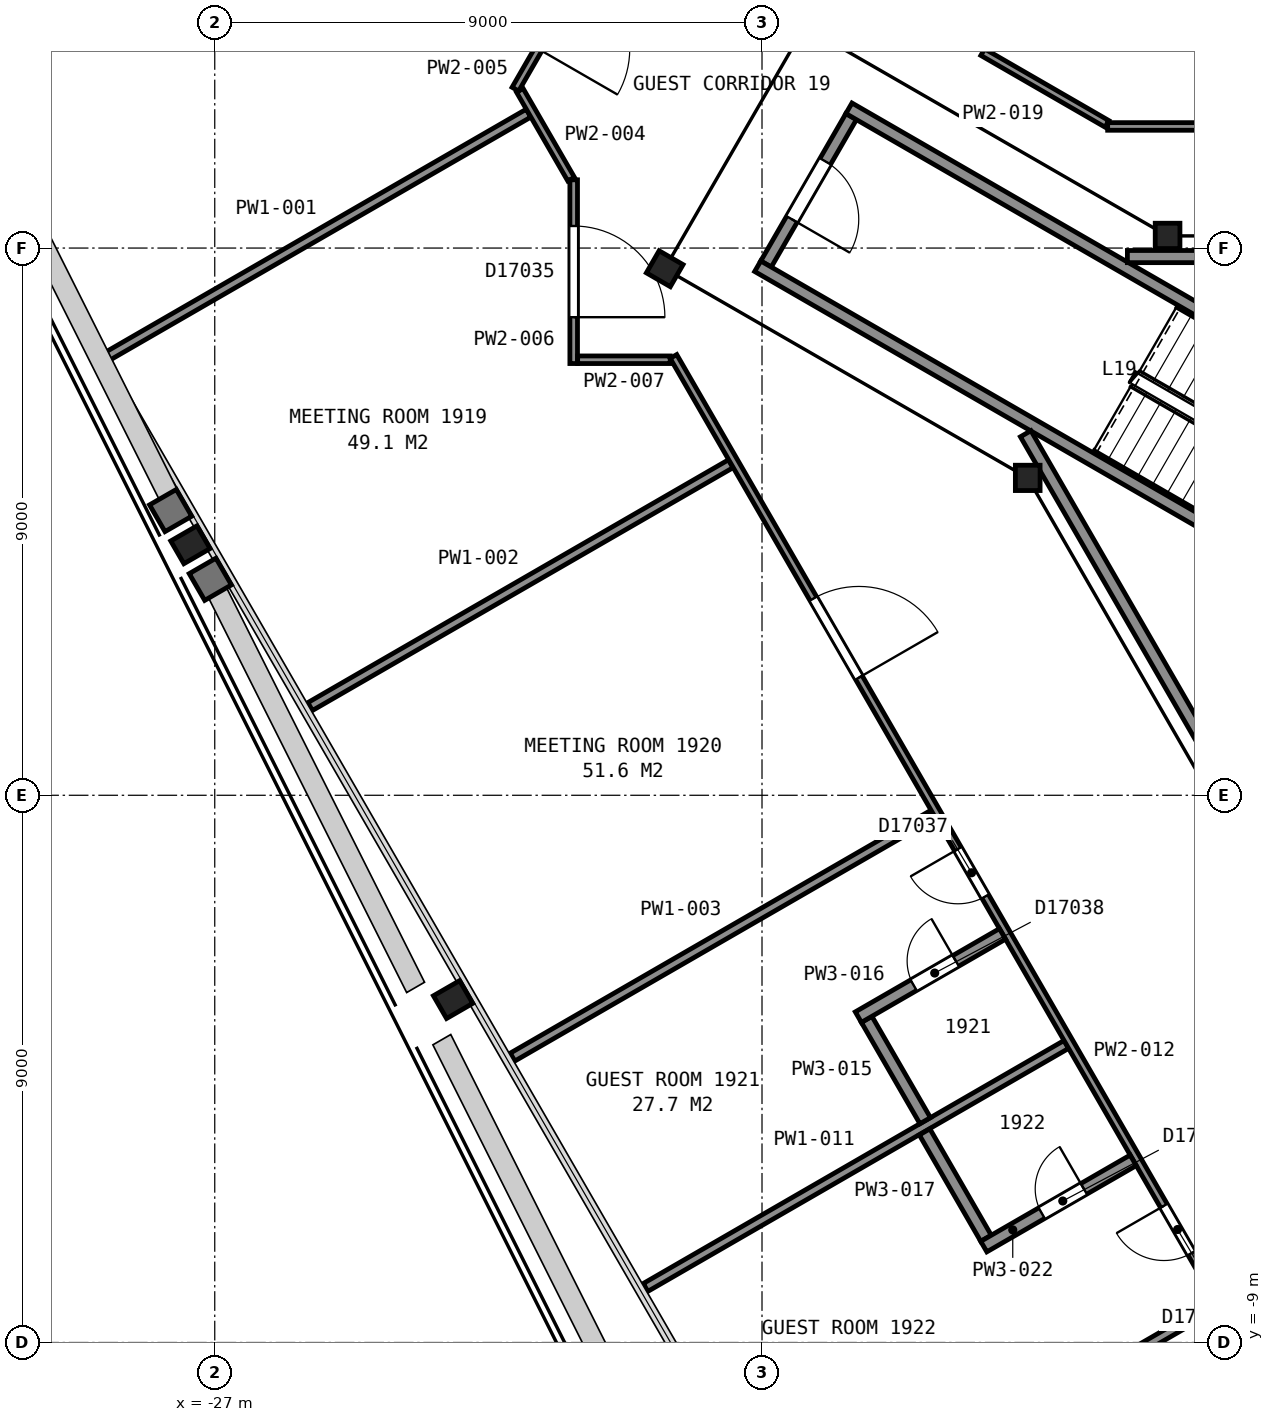
"""IFC4 building model, lengths in metres.
Left out: names, types, materials, properties, quantities, classifications, styles, units other than length and angle.
Written with IfcOpenShell. Run it as: python <this file> out.ifc"""

import sys

from ifc_helpers import new_model, si_unit, direction, frame, frame_2d, origin, origin_2d, place, context, subcontext, project, spatial, rectangle, i_section, extrude, element, fill, save


model = new_model("IFC4")
c1 = context("Model", 3, precision=1e-05, world=origin(), true_north=direction((0.0, 1.0)))
c2 = subcontext(c1, "Body", "Model", "MODEL_VIEW")
j1 = project(units=[si_unit("LENGTHUNIT", "METRE"), si_unit("PLANEANGLEUNIT", "RADIAN")], contexts=[c1])
p1 = place(None, origin())
s1 = spatial("IfcSite", under=j1, at=p1, CompositionType="ELEMENT")
p2 = place(p1, origin())
s2 = spatial("IfcBuilding", under=s1, at=p2, CompositionType="ELEMENT")
p3 = place(p2, frame((0.0, 0.0, 83.6)))
s3 = spatial("IfcBuildingStorey", under=s2, at=p3, CompositionType="ELEMENT", Elevation=83.6)
for number, where, z_axis, x_axis in (
    (1, (-27.4, 4.12, 0.0), (0.0, 0.0, 1.0), (-0.5, 0.866, 0.0)),
    (2, (-23.08, -3.36, 0.0), (0.0, 0.0, 1.0), (-0.5, 0.866, 0.0)),
):
    element("IfcColumn", number, at=place(p3, frame(where, z_axis=z_axis, x_axis=x_axis)), inside=s3, PredefinedType="COLUMN", context=c2, shape_type="SweptSolid", body=[
        extrude(i_section(OverallWidth=0.432, OverallDepth=0.498, WebThickness=0.056, FlangeThickness=0.089, FilletRadius=0.015, at=origin_2d()), origin(), (0.0, 0.0, 1.0), 2.87),
    ])
p4 = place(p3, frame((-11.33, 9.2, 0.0), z_axis=(0.0, 0.0, 1.0), x_axis=(1.0, 0.0, 0.0)))
e3 = element("IfcColumn", 3, at=p4, inside=s3, PredefinedType="COLUMN", context=c2, shape_type="SweptSolid", body=[
    extrude(i_section(OverallWidth=0.406, OverallDepth=0.417, WebThickness=0.03, FlangeThickness=0.048, FilletRadius=0.015, at=origin_2d()), origin(), (0.0, 0.0, 1.0), 3.6),
])
p5 = place(p3, frame((-19.6, 8.66, 0.0), z_axis=(0.0, 0.0, 1.0), x_axis=(0.5, 0.866025403784, 0.0)))
e4 = element("IfcColumn", 4, at=p5, inside=s3, PredefinedType="COLUMN", context=c2, shape_type="SweptSolid", body=[
    extrude(i_section(OverallWidth=0.419, OverallDepth=0.455, WebThickness=0.042, FlangeThickness=0.068, FilletRadius=0.015, at=origin_2d()), origin(), (0.0, 0.0, 1.0), 3.6),
])
p6 = place(p3, frame((-13.63, 5.22, 0.0), z_axis=(0.0, 0.0, 1.0), x_axis=(1.0, 0.0, 0.0)))
e5 = element("IfcColumn", 5, at=p6, inside=s3, PredefinedType="COLUMN", context=c2, shape_type="SweptSolid", body=[
    extrude(i_section(OverallWidth=0.406, OverallDepth=0.417, WebThickness=0.03, FlangeThickness=0.048, FilletRadius=0.015, at=origin_2d()), origin(), (0.0, 0.0, 1.0), 3.6),
])
p7 = place(p3, frame((-16.534, 11.162, 0.0), z_axis=(0.0, 0.0, 1.0), x_axis=(-0.49998411664, -0.866034573852, 0.0)))
e6 = element("IfcWall", 6, at=p7, inside=s3, PredefinedType="PARTITIONING", context=c2, shape_type="SweptSolid", body=[
    extrude(rectangle(XDim=2.8, YDim=0.2, at=frame_2d((1.4, 0.0))), origin(), (0.0, 0.0, 1.0), 3.35),
])
p8 = place(p7, frame((0.85, 0.0, 0.0)))
e7 = element("IfcOpeningElement", 7, at=p8, cuts=e6, PredefinedType="OPENING", context=c2, shape_type="SweptSolid", body=[
    extrude(rectangle(XDim=1.1, YDim=2.1, at=frame_2d((0.55, 1.05))), frame((0.0, 0.11, 0.0), z_axis=(0.0, -1.0, 0.0), x_axis=(1.0, 0.0, 0.0)), (0.0, 0.0, 1.0), 0.22),
])
for number, where, z_axis, x_axis in (
    (8, (-7.678, 2.701, 0.0), (0.0, 0.0, 1.0), (-0.866, 0.5, 0.0)),
    (9, (-6.178, 5.299, 0.0), (0.0, 0.0, 1.0), (-0.866, 0.5, 0.0)),
):
    element("IfcWall", number, at=place(p3, frame(where, z_axis=z_axis, x_axis=x_axis)), inside=s3, PredefinedType="PARTITIONING", context=c2, shape_type="SweptSolid", body=[
        extrude(rectangle(XDim=12.0, YDim=0.2, at=frame_2d((6.0, 0.0))), origin(), (0.0, 0.0, 1.0), 3.35),
    ])
p9 = place(p3, frame((-13.664, 5.946, 0.0), z_axis=(0.0, 0.0, 1.0), x_axis=(0.499994327219, -0.866028678941, 0.0)))
e10 = element("IfcWall", 10, at=p9, inside=s3, PredefinedType="PARTITIONING", context=c2, shape_type="SweptSolid", body=[
    extrude(rectangle(XDim=23.968, YDim=0.2, at=frame_2d((11.984, 0.0))), origin(), (0.0, 0.0, 1.0), 3.35),
])
p10 = place(p3, frame((0.263, 8.86, 0.0), z_axis=(0.0, 0.0, 1.0), x_axis=(-1.0, 0.0, 0.0)))
e11 = element("IfcWall", 11, at=p10, inside=s3, PredefinedType="PARTITIONING", context=c2, shape_type="SweptSolid", body=[
    extrude(rectangle(XDim=12.254, YDim=0.2, at=frame_2d((6.127, 0.0))), origin(), (0.0, 0.0, 1.0), 3.35),
])
p11 = place(p10, frame((5.709, 0.0, 0.0)))
e12 = element("IfcOpeningElement", 12, at=p11, cuts=e11, PredefinedType="OPENING", context=c2, shape_type="SweptSolid", body=[
    extrude(rectangle(XDim=1.8, YDim=2.1, at=frame_2d((0.9, 1.05))), frame((0.0, 0.11, 0.0), z_axis=(0.0, -1.0, 0.0), x_axis=(1.0, 0.0, 0.0)), (0.0, 0.0, 1.0), 0.22),
])
p12 = place(p3, frame((-28.76, 7.223, 0.0), z_axis=(0.0, 0.0, 1.0), x_axis=(0.866019724796, 0.500009836168, 0.0)))
e13 = element("IfcWall", 13, at=p12, inside=s3, PredefinedType="PARTITIONING", context=c2, shape_type="SweptSolid", body=[
    extrude(rectangle(XDim=7.991, YDim=0.15, at=frame_2d((3.996, 0.0))), origin(), (0.0, 0.0, 1.0), 2.262),
])
p13 = place(p3, frame((-25.432, 1.459, 0.0), z_axis=(0.0, 0.0, 1.0), x_axis=(0.866052736899, 0.499952654668, 0.0)))
e14 = element("IfcWall", 14, at=p13, inside=s3, PredefinedType="PARTITIONING", context=c2, shape_type="SweptSolid", body=[
    extrude(rectangle(XDim=7.987, YDim=0.15, at=frame_2d((3.994, 0.0))), origin(), (0.0, 0.0, 1.0), 2.262),
])
p14 = place(p3, frame((-22.103, -4.306, 0.0), z_axis=(0.0, 0.0, 1.0), x_axis=(0.866016576429, 0.500015289116, 0.0)))
e15 = element("IfcWall", 15, at=p14, inside=s3, PredefinedType="PARTITIONING", context=c2, shape_type="SweptSolid", body=[
    extrude(rectangle(XDim=7.987, YDim=0.15, at=frame_2d((3.993, 0.0))), origin(), (0.0, 0.0, 1.0), 2.262),
])
p15 = place(p3, frame((-21.982, 11.594, 0.0), z_axis=(0.0, 0.0, 1.0), x_axis=(0.500048373822, -0.865997473344, 0.0)))
e16 = element("IfcWall", 16, at=p15, inside=s3, PredefinedType="PARTITIONING", context=c2, shape_type="SweptSolid", body=[
    extrude(rectangle(XDim=1.686, YDim=0.125, at=frame_2d((0.843, 0.0))), origin(), (0.0, 0.0, 1.0), 2.262),
])
p16 = place(p3, frame((-22.056, 11.613, 0.0), z_axis=(0.0, 0.0, 1.0), x_axis=(0.499647745683, 0.866228682412, 0.0)))
e17 = element("IfcWall", 17, at=p16, inside=s3, PredefinedType="PARTITIONING", context=c2, shape_type="SweptSolid", body=[
    extrude(rectangle(XDim=2.829, YDim=0.125, at=frame_2d((1.415, 0.0))), origin(), (0.0, 0.0, 1.0), 2.262),
])
p17 = place(p16, frame((0.762, 0.0, 0.0)))
e18 = element("IfcOpeningElement", 18, at=p17, cuts=e17, PredefinedType="OPENING", context=c2, shape_type="SweptSolid", body=[
    extrude(rectangle(XDim=1.5, YDim=2.1, at=frame_2d((0.75, 1.05))), frame((0.0, 0.073, 0.0), z_axis=(0.0, -1.0, 0.0), x_axis=(1.0, 0.0, 0.0)), (0.0, 0.0, 1.0), 0.145),
])
p18 = place(p3, frame((-21.097, 7.101, 0.0), z_axis=(0.0, 0.0, 1.0), x_axis=(0.0, 1.0, 0.0)))
e19 = element("IfcWall", 19, at=p18, inside=s3, PredefinedType="PARTITIONING", context=c2, shape_type="SweptSolid", body=[
    extrude(rectangle(XDim=3.022, YDim=0.125, at=frame_2d((1.511, 0.0))), origin(), (0.0, 0.0, 1.0), 2.262),
])
p19 = place(p18, frame((0.762, 0.0, 0.0)))
e20 = element("IfcOpeningElement", 20, at=p19, cuts=e19, PredefinedType="OPENING", context=c2, shape_type="SweptSolid", body=[
    extrude(rectangle(XDim=1.5, YDim=2.1, at=frame_2d((0.75, 1.05))), frame((0.0, 0.073, 0.0), z_axis=(0.0, -1.0, 0.0), x_axis=(1.0, 0.0, 0.0)), (0.0, 0.0, 1.0), 0.145),
])
p20 = place(p3, frame((-21.032, 7.163, 0.0), z_axis=(0.0, 0.0, 1.0), x_axis=(1.0, 0.0, 0.0)))
e21 = element("IfcWall", 21, at=p20, inside=s3, PredefinedType="PARTITIONING", context=c2, shape_type="SweptSolid", body=[
    extrude(rectangle(XDim=1.522, YDim=0.125, at=frame_2d((0.761, 0.0))), origin(), (0.0, 0.0, 1.0), 2.262),
])
p21 = place(p3, frame((-19.916, -8.095, 0.0), z_axis=(0.0, 0.0, 1.0), x_axis=(0.865953574939, 0.500124390578, 0.0)))
e22 = element("IfcWall", 22, at=p21, inside=s3, PredefinedType="PARTITIONING", context=c2, shape_type="SweptSolid", body=[
    extrude(rectangle(XDim=7.992, YDim=0.15, at=frame_2d((3.996, 0.0))), origin(), (0.0, 0.0, 1.0), 2.262),
])
p22 = place(p3, frame((-3.766, -19.958, 0.0), z_axis=(0.0, 0.0, 1.0), x_axis=(-0.50002170027, 0.866012874765, 0.0)))
e23 = element("IfcWall", 23, at=p22, inside=s3, PredefinedType="PARTITIONING", context=c2, shape_type="SweptSolid", body=[
    extrude(rectangle(XDim=31.379, YDim=0.125, at=frame_2d((15.69, 0.0))), origin(), (0.0, 0.0, 1.0), 2.262),
])
p23 = place(p22, frame((25.28, 0.0, 0.0)))
e24 = element("IfcOpeningElement", 24, at=p23, cuts=e23, PredefinedType="OPENING", context=c2, shape_type="SweptSolid", body=[
    extrude(rectangle(XDim=1.5, YDim=2.1, at=frame_2d((0.75, 1.05))), frame((0.0, 0.073, 0.0), z_axis=(0.0, -1.0, 0.0), x_axis=(1.0, 0.0, 0.0)), (0.0, 0.0, 1.0), 0.145),
])
p24 = place(p22, frame((21.124, 0.0, 0.0)))
e25 = element("IfcOpeningElement", 25, at=p24, cuts=e23, PredefinedType="OPENING", context=c2, shape_type="SweptSolid", body=[
    extrude(rectangle(XDim=0.9, YDim=2.1, at=frame_2d((0.45, 1.05))), frame((0.0, 0.073, 0.0), z_axis=(0.0, -1.0, 0.0), x_axis=(1.0, 0.0, 0.0)), (0.0, 0.0, 1.0), 0.145),
])
p25 = place(p22, frame((14.349, 0.0, 0.0)))
e26 = element("IfcOpeningElement", 26, at=p25, cuts=e23, PredefinedType="OPENING", context=c2, shape_type="SweptSolid", body=[
    extrude(rectangle(XDim=0.9, YDim=2.1, at=frame_2d((0.45, 1.05))), frame((0.0, 0.073, 0.0), z_axis=(0.0, -1.0, 0.0), x_axis=(1.0, 0.0, 0.0)), (0.0, 0.0, 1.0), 0.145),
])
p26 = place(p22, frame((11.804, 0.0, 0.0)))
e27 = element("IfcOpeningElement", 27, at=p26, cuts=e23, PredefinedType="OPENING", context=c2, shape_type="SweptSolid", body=[
    extrude(rectangle(XDim=0.9, YDim=2.1, at=frame_2d((0.45, 1.05))), frame((0.0, 0.073, 0.0), z_axis=(0.0, -1.0, 0.0), x_axis=(1.0, 0.0, 0.0)), (0.0, 0.0, 1.0), 0.145),
])
p27 = place(p22, frame((5.33, 0.0, 0.0)))
e28 = element("IfcOpeningElement", 28, at=p27, cuts=e23, PredefinedType="OPENING", context=c2, shape_type="SweptSolid", body=[
    extrude(rectangle(XDim=0.9, YDim=2.1, at=frame_2d((0.45, 1.05))), frame((0.0, 0.073, 0.0), z_axis=(0.0, -1.0, 0.0), x_axis=(1.0, 0.0, 0.0)), (0.0, 0.0, 1.0), 0.145),
])
p28 = place(p22, frame((2.906, 0.0, 0.0)))
e29 = element("IfcOpeningElement", 29, at=p28, cuts=e23, PredefinedType="OPENING", context=c2, shape_type="SweptSolid", body=[
    extrude(rectangle(XDim=1.0, YDim=2.1, at=frame_2d((0.5, 1.05))), frame((0.0, 0.073, 0.0), z_axis=(0.0, -1.0, 0.0), x_axis=(1.0, 0.0, 0.0)), (0.0, 0.0, 1.0), 0.145),
])
p29 = place(p3, frame((-17.443, -12.377, 0.0), z_axis=(0.0, 0.0, 1.0), x_axis=(0.866021771655, 0.500006290979, 0.0)))
e30 = element("IfcWall", 30, at=p29, inside=s3, PredefinedType="PARTITIONING", context=c2, shape_type="SweptSolid", body=[
    extrude(rectangle(XDim=7.992, YDim=0.15, at=frame_2d((3.996, 0.0))), origin(), (0.0, 0.0, 1.0), 2.262),
])
p30 = place(p3, frame((-16.279, -3.686, 0.0), z_axis=(0.0, 0.0, 1.0), x_axis=(0.500190942922, -0.865915134767, 0.0)))
e31 = element("IfcWall", 31, at=p30, inside=s3, PredefinedType="PARTITIONING", context=c2, shape_type="SweptSolid", body=[
    extrude(rectangle(XDim=1.925, YDim=0.2, at=frame_2d((0.962, 0.0))), origin(), (0.0, 0.0, 1.0), 2.262),
])
p31 = place(p3, frame((-14.045, -2.28, 0.0), z_axis=(0.0, 0.0, 1.0), x_axis=(-0.866005850709, -0.50003386539, 0.0)))
e32 = element("IfcWall", 32, at=p31, inside=s3, PredefinedType="PARTITIONING", context=c2, shape_type="SweptSolid", body=[
    extrude(rectangle(XDim=2.737, YDim=0.2, at=frame_2d((1.369, 0.0))), origin(), (0.0, 0.0, 1.0), 2.262),
])
p32 = place(p31, frame((0.887, 0.0, 0.0)))
e33 = element("IfcOpeningElement", 33, at=p32, cuts=e32, PredefinedType="OPENING", context=c2, shape_type="SweptSolid", body=[
    extrude(rectangle(XDim=0.8, YDim=2.1, at=frame_2d((0.4, 1.05))), frame((0.0, 0.11, 0.0), z_axis=(0.0, -1.0, 0.0), x_axis=(1.0, 0.0, 0.0)), (0.0, 0.0, 1.0), 0.22),
])
p33 = place(p3, frame((-15.326, -5.536, 0.0), z_axis=(0.0, 0.0, 1.0), x_axis=(0.499868889286, -0.866101087359, 0.0)))
e34 = element("IfcWall", 34, at=p33, inside=s3, PredefinedType="PARTITIONING", context=c2, shape_type="SweptSolid", body=[
    extrude(rectangle(XDim=2.021, YDim=0.2, at=frame_2d((1.01, 0.0))), origin(), (0.0, 0.0, 1.0), 2.262),
])
p34 = place(p3, frame((-14.37, 12.222, 0.0), z_axis=(0.0, 0.0, 1.0), x_axis=(0.866063239147, -0.499934461503, 0.0)))
e35 = element("IfcWall", 35, at=p34, inside=s3, PredefinedType="PARTITIONING", context=c2, shape_type="SweptSolid", body=[
    extrude(rectangle(XDim=2.359, YDim=0.125, at=frame_2d((1.18, 0.0))), origin(), (0.0, 0.0, 1.0), 2.262),
])
p35 = place(p3, frame((-14.353, -7.423, 0.0), z_axis=(0.0, 0.0, 1.0), x_axis=(0.866010792954, 0.500025305846, 0.0)))
e36 = element("IfcWall", 36, at=p35, inside=s3, PredefinedType="PARTITIONING", context=c2, shape_type="SweptSolid", body=[
    extrude(rectangle(XDim=2.838, YDim=0.2, at=frame_2d((1.419, 0.0))), origin(), (0.0, 0.0, 1.0), 2.262),
])
p36 = place(p35, frame((1.1, 0.0, 0.0)))
e37 = element("IfcOpeningElement", 37, at=p36, cuts=e36, PredefinedType="OPENING", context=c2, shape_type="SweptSolid", body=[
    extrude(rectangle(XDim=0.8, YDim=2.1, at=frame_2d((0.4, 1.05))), frame((0.0, 0.11, 0.0), z_axis=(0.0, -1.0, 0.0), x_axis=(1.0, 0.0, 0.0)), (0.0, 0.0, 1.0), 0.22),
])
p37 = place(p3, frame((-12.315, 11.0, 0.0), z_axis=(0.0, 0.0, 1.0), x_axis=(1.0, 0.0, 0.0)))
e38 = element("IfcWall", 38, at=p37, inside=s3, PredefinedType="PARTITIONING", context=c2, shape_type="SweptSolid", body=[
    extrude(rectangle(XDim=24.631, YDim=0.125, at=frame_2d((12.315, 0.0))), origin(), (0.0, 0.0, 1.0), 2.262),
])
p38 = place(p37, frame((11.812, 0.0, 0.0)))
e39 = element("IfcOpeningElement", 39, at=p38, cuts=e38, PredefinedType="OPENING", context=c2, shape_type="SweptSolid", body=[
    extrude(rectangle(XDim=1.0, YDim=2.1, at=frame_2d((0.5, 1.05))), frame((0.0, 0.073, 0.0), z_axis=(0.0, -1.0, 0.0), x_axis=(1.0, 0.0, 0.0)), (0.0, 0.0, 1.0), 0.145),
])
p39 = place(p8, origin())
e40 = element("IfcDoor", 40, at=p39, inside=s3, OperationType="SINGLE_SWING_RIGHT", PredefinedType="DOOR", context=c2, shape_type="SweptSolid", body=[
    extrude(rectangle(XDim=1.1, YDim=2.1, at=frame_2d((0.55, 1.05))), frame((0.0, 0.025, 0.0), z_axis=(0.0, -1.0, 0.0), x_axis=(1.0, 0.0, 0.0)), (0.0, 0.0, 1.0), 0.05),
])
fill(e7, e40)
p40 = place(p19, origin())
e41 = element("IfcDoor", 41, at=p40, inside=s3, OperationType="DOUBLE_DOOR_SINGLE_SWING", PredefinedType="DOOR", context=c2, shape_type="SweptSolid", body=[
    extrude(rectangle(XDim=1.5, YDim=2.1, at=frame_2d((0.75, 1.05))), frame((0.0, 0.025, 0.0), z_axis=(0.0, -1.0, 0.0), x_axis=(1.0, 0.0, 0.0)), (0.0, 0.0, 1.0), 0.05),
])
fill(e20, e41)
p41 = place(p23, origin())
e42 = element("IfcDoor", 42, at=p41, inside=s3, OperationType="DOUBLE_DOOR_SINGLE_SWING", PredefinedType="DOOR", context=c2, shape_type="SweptSolid", body=[
    extrude(rectangle(XDim=1.5, YDim=2.1, at=frame_2d((0.75, 1.05))), frame((0.0, 0.025, 0.0), z_axis=(0.0, -1.0, 0.0), x_axis=(1.0, 0.0, 0.0)), (0.0, 0.0, 1.0), 0.05),
])
fill(e24, e42)
p42 = place(p24, origin())
e43 = element("IfcDoor", 43, at=p42, inside=s3, OperationType="SINGLE_SWING_RIGHT", PredefinedType="DOOR", context=c2, shape_type="SweptSolid", body=[
    extrude(rectangle(XDim=0.9, YDim=2.1, at=frame_2d((0.45, 1.05))), frame((0.0, 0.025, 0.0), z_axis=(0.0, -1.0, 0.0), x_axis=(1.0, 0.0, 0.0)), (0.0, 0.0, 1.0), 0.05),
])
fill(e25, e43)
p43 = place(p25, origin())
e44 = element("IfcDoor", 44, at=p43, inside=s3, OperationType="SINGLE_SWING_RIGHT", PredefinedType="DOOR", context=c2, shape_type="SweptSolid", body=[
    extrude(rectangle(XDim=0.9, YDim=2.1, at=frame_2d((0.45, 1.05))), frame((0.0, 0.025, 0.0), z_axis=(0.0, -1.0, 0.0), x_axis=(1.0, 0.0, 0.0)), (0.0, 0.0, 1.0), 0.05),
])
fill(e26, e44)
p44 = place(p32, origin())
e45 = element("IfcDoor", 45, at=p44, inside=s3, OperationType="SINGLE_SWING_LEFT", PredefinedType="DOOR", context=c2, shape_type="SweptSolid", body=[
    extrude(rectangle(XDim=0.8, YDim=2.1, at=frame_2d((0.4, 1.05))), frame((0.0, 0.025, 0.0), z_axis=(0.0, -1.0, 0.0), x_axis=(1.0, 0.0, 0.0)), (0.0, 0.0, 1.0), 0.05),
])
fill(e33, e45)
p45 = place(p36, origin())
e46 = element("IfcDoor", 46, at=p45, inside=s3, OperationType="SINGLE_SWING_RIGHT", PredefinedType="DOOR", context=c2, shape_type="SweptSolid", body=[
    extrude(rectangle(XDim=0.8, YDim=2.1, at=frame_2d((0.4, 1.05))), frame((0.0, 0.025, 0.0), z_axis=(0.0, -1.0, 0.0), x_axis=(1.0, 0.0, 0.0)), (0.0, 0.0, 1.0), 0.05),
])
fill(e37, e46)
save(model, sys.argv[1])
